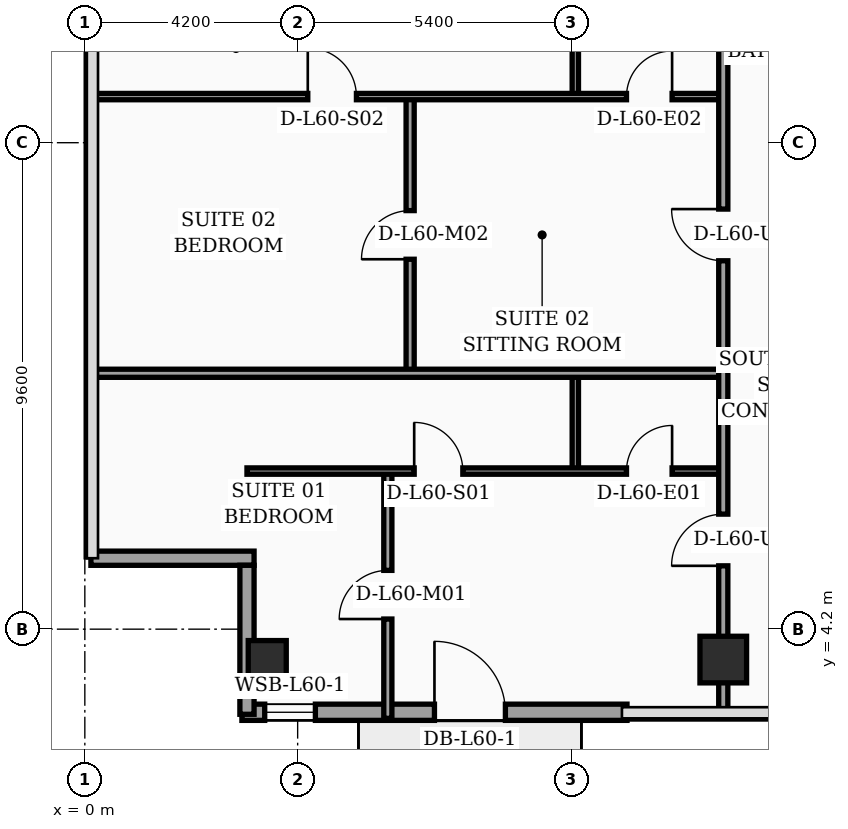
"""IFC4 building model, lengths in metres.
Left out: names, types, materials, properties, quantities, classifications, styles, units other than length and angle.
Written with IfcOpenShell. Run it as: python <this file> out.ifc"""

import sys

from ifc_helpers import new_model, si_unit, direction, frame, frame_2d, origin, origin_2d, place, context, subcontext, project, spatial, rectangle, hollow_rectangle, extrude, element, fill, save


model = new_model("IFC4")
c1 = context("Model", 3, precision=1e-05, world=origin(), true_north=direction((0.0, 1.0)))
c2 = subcontext(c1, "Body", "Model", "MODEL_VIEW")
j1 = project(units=[si_unit("LENGTHUNIT", "METRE"), si_unit("PLANEANGLEUNIT", "RADIAN")], contexts=[c1])
p1 = place(None, origin())
s1 = spatial("IfcSite", under=j1, at=p1, CompositionType="ELEMENT")
p2 = place(p1, origin())
s2 = spatial("IfcBuilding", under=s1, at=p2, CompositionType="ELEMENT")
p3 = place(p2, frame((0.0, 0.0, 243.8)))
s3 = spatial("IfcBuildingStorey", under=s2, at=p3, CompositionType="ELEMENT", Elevation=243.8)
p4 = place(p3, frame((3.6, 3.6, 0.0), z_axis=(0.0, 0.0, 1.0), x_axis=(1.0, 0.0, 0.0)))
e1 = element("IfcColumn", 1, at=p4, inside=s3, PredefinedType="COLUMN", context=c2, shape_type="SweptSolid", body=[
    extrude(hollow_rectangle(XDim=0.75, YDim=0.75, WallThickness=0.032, at=origin_2d()), origin(), (0.0, 0.0, 1.0), 3.56),
])
p5 = place(p3, frame((12.6, 3.6, 0.0), z_axis=(0.0, 0.0, 1.0), x_axis=(1.0, 0.0, 0.0)))
e2 = element("IfcColumn", 2, at=p5, inside=s3, PredefinedType="COLUMN", context=c2, shape_type="SweptSolid", body=[
    extrude(rectangle(XDim=0.92, YDim=0.92, at=origin_2d()), origin(), (0.0, 0.0, 1.0), 3.56),
])
p6 = place(p3, frame((3.1, 2.56, 0.0), z_axis=(0.0, 0.0, 1.0), x_axis=(1.0, 0.0, 0.0)))
e3 = element("IfcWall", 3, at=p6, inside=s3, PredefinedType="SOLIDWALL", context=c2, shape_type="SweptSolid", body=[
    extrude(rectangle(XDim=7.6, YDim=0.32, at=frame_2d((3.8, 0.0))), origin(), (0.0, 0.0, 1.0), 3.56),
])
p7 = place(p6, frame((0.45, 0.0, 0.75)))
e4 = element("IfcOpeningElement", 4, at=p7, cuts=e3, PredefinedType="OPENING", context=c2, shape_type="SweptSolid", body=[
    extrude(rectangle(XDim=1.0, YDim=1.6, at=frame_2d((0.5, 0.8))), frame((0.0, 0.17, 0.0), z_axis=(0.0, -1.0, 0.0), x_axis=(1.0, 0.0, 0.0)), (0.0, 0.0, 1.0), 0.34),
])
p8 = place(p6, frame((3.8, 0.0, 0.0)))
e5 = element("IfcOpeningElement", 5, at=p8, cuts=e3, PredefinedType="OPENING", context=c2, shape_type="SweptSolid", body=[
    extrude(rectangle(XDim=1.4, YDim=2.25, at=frame_2d((0.7, 1.125))), frame((0.0, 0.17, 0.0), z_axis=(0.0, -1.0, 0.0), x_axis=(1.0, 0.0, 0.0)), (0.0, 0.0, 1.0), 0.34),
])
p9 = place(p3, frame((0.12, 5.6, 0.0), z_axis=(0.0, 0.0, 1.0), x_axis=(1.0, 0.0, 0.0)))
e6 = element("IfcWall", 6, at=p9, inside=s3, PredefinedType="SOLIDWALL", context=c2, shape_type="SweptSolid", body=[
    extrude(rectangle(XDim=3.22, YDim=0.28, at=frame_2d((1.61, 0.0))), origin(), (0.0, 0.0, 1.0), 2.99),
])
p10 = place(p3, frame((3.2, 5.46, 0.0), z_axis=(0.0, 0.0, 1.0), x_axis=(0.0, -1.0, 0.0)))
e7 = element("IfcWall", 7, at=p10, inside=s3, PredefinedType="SOLIDWALL", context=c2, shape_type="SweptSolid", body=[
    extrude(rectangle(XDim=2.94, YDim=0.28, at=frame_2d((1.47, 0.0))), origin(), (0.0, 0.0, 1.0), 2.99),
])
p11 = place(p3, frame((9.68, 7.32, 0.0), z_axis=(0.0, 0.0, 1.0), x_axis=(0.0, 1.0, 0.0)))
e8 = element("IfcWall", 8, at=p11, inside=s3, PredefinedType="PARTITIONING", context=c2, shape_type="SweptSolid", body=[
    extrude(rectangle(XDim=1.93, YDim=0.125, at=frame_2d((0.965, 0.0))), origin(), (0.0, 0.0, 1.0), 3.09),
])
p12 = place(p3, frame((5.98, 2.44, 0.0), z_axis=(0.0, 0.0, 1.0), x_axis=(0.0, 1.0, 0.0)))
e9 = element("IfcWall", 9, at=p12, inside=s3, PredefinedType="PARTITIONING", context=c2, shape_type="SweptSolid", body=[
    extrude(rectangle(XDim=4.88, YDim=0.16, at=frame_2d((2.44, 0.0))), origin(), (0.0, 0.0, 1.0), 3.09),
])
p13 = place(p12, frame((1.96, 0.0, 0.0)))
e10 = element("IfcOpeningElement", 10, at=p13, cuts=e9, PredefinedType="OPENING", context=c2, shape_type="SweptSolid", body=[
    extrude(rectangle(XDim=0.96, YDim=2.2, at=frame_2d((0.48, 1.1))), frame((0.0, 0.09, 0.0), z_axis=(0.0, -1.0, 0.0), x_axis=(1.0, 0.0, 0.0)), (0.0, 0.0, 1.0), 0.18),
])
p14 = place(p3, frame((3.2, 7.32, 0.0), z_axis=(0.0, 0.0, 1.0), x_axis=(1.0, 0.0, 0.0)))
e11 = element("IfcWall", 11, at=p14, inside=s3, PredefinedType="PARTITIONING", context=c2, shape_type="SweptSolid", body=[
    extrude(rectangle(XDim=9.4, YDim=0.125, at=frame_2d((4.7, 0.0))), origin(), (0.0, 0.0, 1.0), 2.99),
])
p15 = place(p14, frame((3.3, 0.0, 0.0)))
e12 = element("IfcOpeningElement", 12, at=p15, cuts=e11, PredefinedType="OPENING", context=c2, shape_type="SweptSolid", body=[
    extrude(rectangle(XDim=0.96, YDim=2.2, at=frame_2d((0.48, 1.1))), frame((0.0, 0.073, 0.0), z_axis=(0.0, -1.0, 0.0), x_axis=(1.0, 0.0, 0.0)), (0.0, 0.0, 1.0), 0.145),
])
p16 = place(p14, frame((7.49, 0.0, 0.0)))
e13 = element("IfcOpeningElement", 13, at=p16, cuts=e11, PredefinedType="OPENING", context=c2, shape_type="SweptSolid", body=[
    extrude(rectangle(XDim=0.9, YDim=2.15, at=frame_2d((0.45, 1.075))), frame((0.0, 0.073, 0.0), z_axis=(0.0, -1.0, 0.0), x_axis=(1.0, 0.0, 0.0)), (0.0, 0.0, 1.0), 0.145),
])
p17 = place(p3, frame((9.68, 14.71, 0.0), z_axis=(0.0, 0.0, 1.0), x_axis=(0.0, 1.0, 0.0)))
e14 = element("IfcWall", 14, at=p17, inside=s3, PredefinedType="PARTITIONING", context=c2, shape_type="SweptSolid", body=[
    extrude(rectangle(XDim=2.09, YDim=0.125, at=frame_2d((1.045, 0.0))), origin(), (0.0, 0.0, 1.0), 3.56),
])
p18 = place(p3, frame((6.42, 9.25, 0.0), z_axis=(0.0, 0.0, 1.0), x_axis=(0.0, 1.0, 0.0)))
e15 = element("IfcWall", 15, at=p18, inside=s3, PredefinedType="PARTITIONING", context=c2, shape_type="SweptSolid", body=[
    extrude(rectangle(XDim=5.46, YDim=0.16, at=frame_2d((2.73, 0.0))), origin(), (0.0, 0.0, 1.0), 3.14),
])
p19 = place(p18, frame((2.25, 0.0, 0.0)))
e16 = element("IfcOpeningElement", 16, at=p19, cuts=e15, PredefinedType="OPENING", context=c2, shape_type="SweptSolid", body=[
    extrude(rectangle(XDim=0.96, YDim=2.2, at=frame_2d((0.48, 1.1))), frame((0.0, 0.09, 0.0), z_axis=(0.0, -1.0, 0.0), x_axis=(1.0, 0.0, 0.0)), (0.0, 0.0, 1.0), 0.18),
])
p20 = place(p3, frame((0.08, 14.71, 0.0), z_axis=(0.0, 0.0, 1.0), x_axis=(1.0, 0.0, 0.0)))
e17 = element("IfcWall", 17, at=p20, inside=s3, PredefinedType="PARTITIONING", context=c2, shape_type="SweptSolid", body=[
    extrude(rectangle(XDim=12.52, YDim=0.125, at=frame_2d((6.26, 0.0))), origin(), (0.0, 0.0, 1.0), 2.99),
])
p21 = place(p20, frame((4.32, 0.0, 0.0)))
e18 = element("IfcOpeningElement", 18, at=p21, cuts=e17, PredefinedType="OPENING", context=c2, shape_type="SweptSolid", body=[
    extrude(rectangle(XDim=0.96, YDim=2.2, at=frame_2d((0.48, 1.1))), frame((0.0, 0.073, 0.0), z_axis=(0.0, -1.0, 0.0), x_axis=(1.0, 0.0, 0.0)), (0.0, 0.0, 1.0), 0.145),
])
p22 = place(p20, frame((10.61, 0.0, 0.0)))
e19 = element("IfcOpeningElement", 19, at=p22, cuts=e17, PredefinedType="OPENING", context=c2, shape_type="SweptSolid", body=[
    extrude(rectangle(XDim=0.9, YDim=2.15, at=frame_2d((0.45, 1.075))), frame((0.0, 0.073, 0.0), z_axis=(0.0, -1.0, 0.0), x_axis=(1.0, 0.0, 0.0)), (0.0, 0.0, 1.0), 0.145),
])
p23 = place(p3, frame((0.08, 9.25, 0.0), z_axis=(0.0, 0.0, 1.0), x_axis=(1.0, 0.0, 0.0)))
e20 = element("IfcWall", 20, at=p23, inside=s3, PredefinedType="PARTITIONING", context=c2, shape_type="SweptSolid", body=[
    extrude(rectangle(XDim=12.52, YDim=0.16, at=frame_2d((6.26, 0.0))), origin(), (0.0, 0.0, 1.0), 2.99),
])
p24 = place(p3, frame((12.6, 2.44, 0.0), z_axis=(0.0, 0.0, 1.0), x_axis=(0.0, 1.0, 0.0)))
e21 = element("IfcWall", 21, at=p24, inside=s3, PredefinedType="PARTITIONING", context=c2, shape_type="SweptSolid", body=[
    extrude(rectangle(XDim=14.36, YDim=0.18, at=frame_2d((7.18, 0.0))), origin(), (0.0, 0.0, 1.0), 2.99),
])
p25 = place(p24, frame((3.01, 0.0, 0.0)))
e22 = element("IfcOpeningElement", 22, at=p25, cuts=e21, PredefinedType="OPENING", context=c2, shape_type="SweptSolid", body=[
    extrude(rectangle(XDim=1.02, YDim=2.2, at=frame_2d((0.51, 1.1))), frame((0.0, 0.1, 0.0), z_axis=(0.0, -1.0, 0.0), x_axis=(1.0, 0.0, 0.0)), (0.0, 0.0, 1.0), 0.2),
])
p26 = place(p24, frame((9.03, 0.0, 0.0)))
e23 = element("IfcOpeningElement", 23, at=p26, cuts=e21, PredefinedType="OPENING", context=c2, shape_type="SweptSolid", body=[
    extrude(rectangle(XDim=1.02, YDim=2.2, at=frame_2d((0.51, 1.1))), frame((0.0, 0.1, 0.0), z_axis=(0.0, -1.0, 0.0), x_axis=(1.0, 0.0, 0.0)), (0.0, 0.0, 1.0), 0.2),
])
p27 = place(p7, origin())
e24 = element("IfcWindow", 24, at=p27, inside=s3, PartitioningType="SINGLE_PANEL", PredefinedType="WINDOW", context=c2, shape_type="SweptSolid", body=[
    extrude(rectangle(XDim=1.0, YDim=1.6, at=frame_2d((0.5, 0.8))), frame((0.0, 0.03, 0.0), z_axis=(0.0, -1.0, 0.0), x_axis=(1.0, 0.0, 0.0)), (0.0, 0.0, 1.0), 0.06),
])
fill(e4, e24)
p28 = place(p8, origin())
e25 = element("IfcDoor", 25, at=p28, inside=s3, OperationType="SINGLE_SWING_LEFT", PredefinedType="DOOR", context=c2, shape_type="SweptSolid", body=[
    extrude(rectangle(XDim=1.4, YDim=2.25, at=frame_2d((0.7, 1.125))), frame((0.0, 0.025, 0.0), z_axis=(0.0, -1.0, 0.0), x_axis=(1.0, 0.0, 0.0)), (0.0, 0.0, 1.0), 0.05),
])
fill(e5, e25)
p29 = place(p13, origin())
e26 = element("IfcDoor", 26, at=p29, inside=s3, OperationType="SINGLE_SWING_LEFT", PredefinedType="DOOR", context=c2, shape_type="SweptSolid", body=[
    extrude(rectangle(XDim=0.96, YDim=2.2, at=frame_2d((0.48, 1.1))), frame((0.0, 0.025, 0.0), z_axis=(0.0, -1.0, 0.0), x_axis=(1.0, 0.0, 0.0)), (0.0, 0.0, 1.0), 0.05),
])
fill(e10, e26)
p30 = place(p15, origin())
e27 = element("IfcDoor", 27, at=p30, inside=s3, OperationType="SINGLE_SWING_LEFT", PredefinedType="DOOR", context=c2, shape_type="SweptSolid", body=[
    extrude(rectangle(XDim=0.96, YDim=2.2, at=frame_2d((0.48, 1.1))), frame((0.0, 0.025, 0.0), z_axis=(0.0, -1.0, 0.0), x_axis=(1.0, 0.0, 0.0)), (0.0, 0.0, 1.0), 0.05),
])
fill(e12, e27)
p31 = place(p16, origin())
e28 = element("IfcDoor", 28, at=p31, inside=s3, OperationType="SINGLE_SWING_RIGHT", PredefinedType="DOOR", context=c2, shape_type="SweptSolid", body=[
    extrude(rectangle(XDim=0.9, YDim=2.15, at=frame_2d((0.45, 1.075))), frame((0.0, 0.025, 0.0), z_axis=(0.0, -1.0, 0.0), x_axis=(1.0, 0.0, 0.0)), (0.0, 0.0, 1.0), 0.05),
])
fill(e13, e28)
p32 = place(p19, origin())
e29 = element("IfcDoor", 29, at=p32, inside=s3, OperationType="SINGLE_SWING_LEFT", PredefinedType="DOOR", context=c2, shape_type="SweptSolid", body=[
    extrude(rectangle(XDim=0.96, YDim=2.2, at=frame_2d((0.48, 1.1))), frame((0.0, 0.025, 0.0), z_axis=(0.0, -1.0, 0.0), x_axis=(1.0, 0.0, 0.0)), (0.0, 0.0, 1.0), 0.05),
])
fill(e16, e29)
p33 = place(p21, origin())
e30 = element("IfcDoor", 30, at=p33, inside=s3, OperationType="SINGLE_SWING_LEFT", PredefinedType="DOOR", context=c2, shape_type="SweptSolid", body=[
    extrude(rectangle(XDim=0.96, YDim=2.2, at=frame_2d((0.48, 1.1))), frame((0.0, 0.025, 0.0), z_axis=(0.0, -1.0, 0.0), x_axis=(1.0, 0.0, 0.0)), (0.0, 0.0, 1.0), 0.05),
])
fill(e18, e30)
p34 = place(p22, origin())
e31 = element("IfcDoor", 31, at=p34, inside=s3, OperationType="SINGLE_SWING_RIGHT", PredefinedType="DOOR", context=c2, shape_type="SweptSolid", body=[
    extrude(rectangle(XDim=0.9, YDim=2.15, at=frame_2d((0.45, 1.075))), frame((0.0, 0.025, 0.0), z_axis=(0.0, -1.0, 0.0), x_axis=(1.0, 0.0, 0.0)), (0.0, 0.0, 1.0), 0.05),
])
fill(e19, e31)
p35 = place(p25, origin())
e32 = element("IfcDoor", 32, at=p35, inside=s3, OperationType="SINGLE_SWING_LEFT", PredefinedType="DOOR", context=c2, shape_type="SweptSolid", body=[
    extrude(rectangle(XDim=1.02, YDim=2.2, at=frame_2d((0.51, 1.1))), frame((0.0, 0.025, 0.0), z_axis=(0.0, -1.0, 0.0), x_axis=(1.0, 0.0, 0.0)), (0.0, 0.0, 1.0), 0.05),
])
fill(e22, e32)
p36 = place(p26, origin())
e33 = element("IfcDoor", 33, at=p36, inside=s3, OperationType="SINGLE_SWING_RIGHT", PredefinedType="DOOR", context=c2, shape_type="SweptSolid", body=[
    extrude(rectangle(XDim=1.02, YDim=2.2, at=frame_2d((0.51, 1.1))), frame((0.0, 0.025, 0.0), z_axis=(0.0, -1.0, 0.0), x_axis=(1.0, 0.0, 0.0)), (0.0, 0.0, 1.0), 0.05),
])
fill(e23, e33)
save(model, sys.argv[1])
